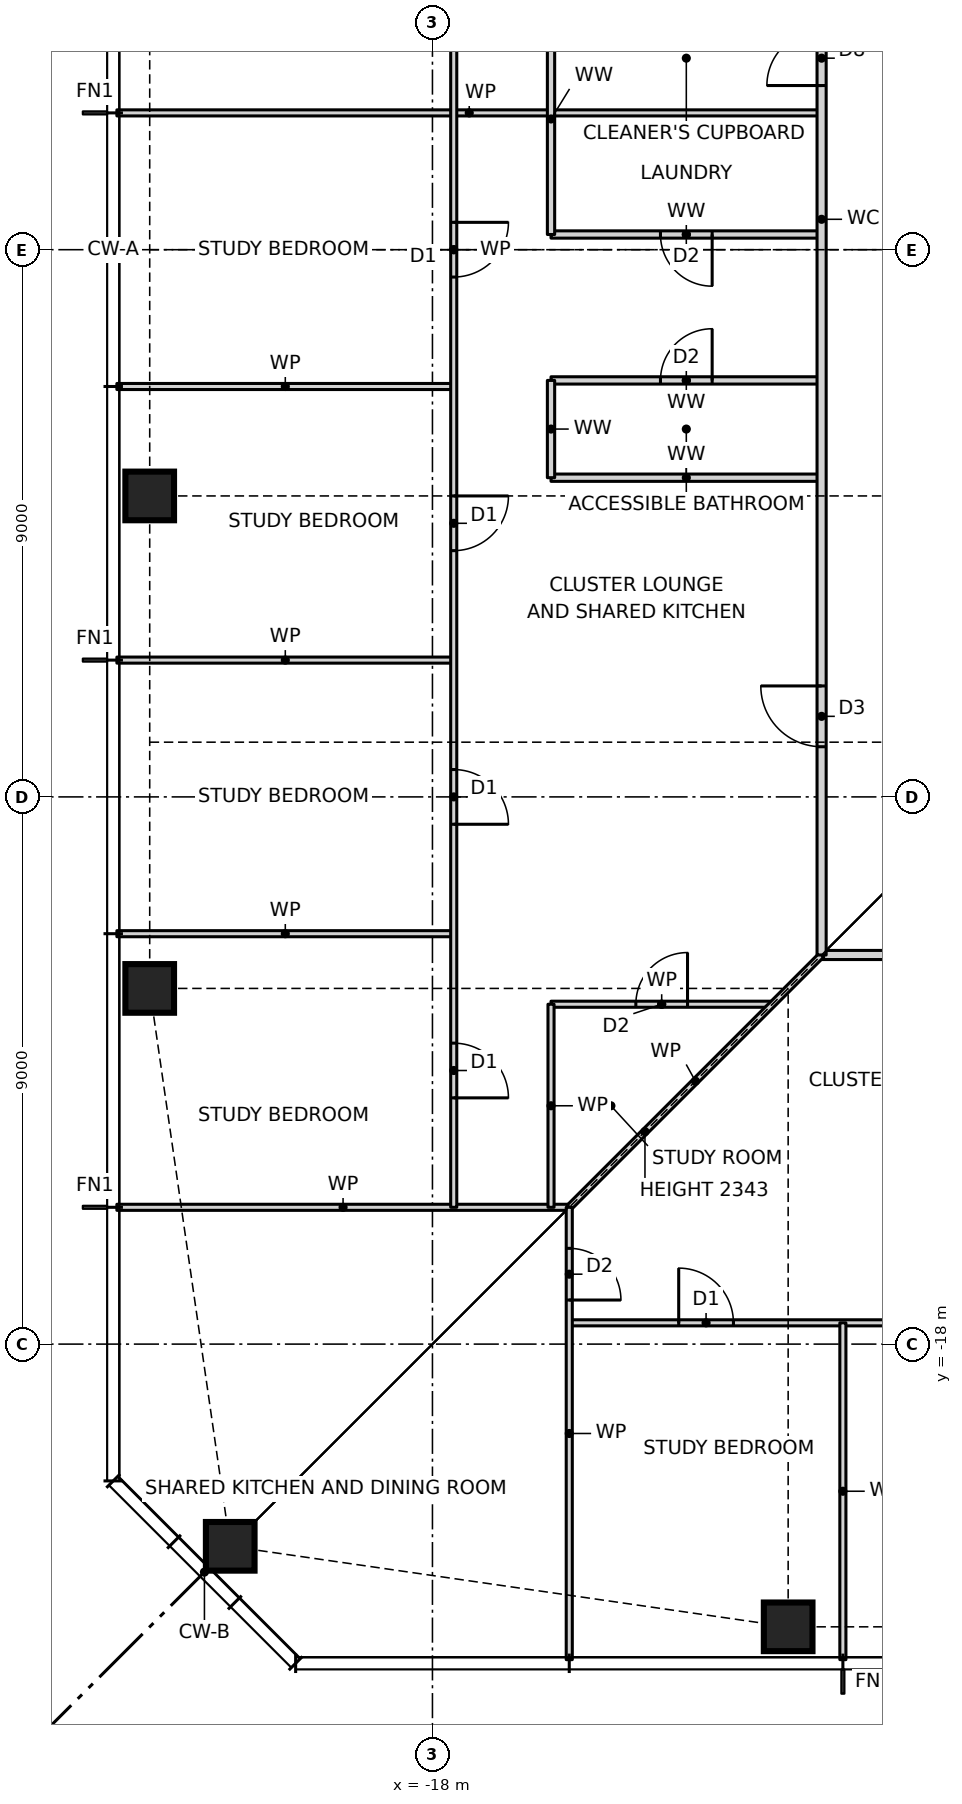
"""IFC4 building model, lengths in metres.
Left out: names, types, materials, properties, quantities, classifications, styles, units other than length and angle.
Written with IfcOpenShell. Run it as: python <this file> out.ifc"""

import sys

from ifc_helpers import new_model, si_unit, direction, frame, frame_2d, origin, origin_2d, place, context, subcontext, project, spatial, rectangle, hollow_rectangle, extrude, element, fill, save


model = new_model("IFC4")
c1 = context("Model", 3, precision=1e-05, world=origin(), true_north=direction((0.0, 1.0)))
c2 = subcontext(c1, "Body", "Model", "MODEL_VIEW")
j1 = project(units=[si_unit("LENGTHUNIT", "METRE"), si_unit("PLANEANGLEUNIT", "RADIAN")], contexts=[c1])
p1 = place(None, origin())
s1 = spatial("IfcSite", under=j1, at=p1, CompositionType="ELEMENT")
p2 = place(p1, origin())
s2 = spatial("IfcBuilding", under=s1, at=p2, CompositionType="ELEMENT")
p3 = place(p2, frame((0.0, 0.0, 57.0)))
s3 = spatial("IfcBuildingStorey", under=s2, at=p3, CompositionType="ELEMENT", Elevation=57.0)
for number, where, z_axis, x_axis in (
    (1, (-21.326, -21.326, 0.0), (0.0, 0.0, 1.0), (1.0, 0.0, 0.0)),
    (2, (-12.15, -22.65, 0.0), (0.0, 0.0, 1.0), (1.0, 0.0, 0.0)),
    (3, (-22.65, -4.05, 0.0), (0.0, 0.0, 1.0), (1.0, 0.0, 0.0)),
    (4, (-22.65, -12.15, 0.0), (0.0, 0.0, 1.0), (1.0, 0.0, 0.0)),
):
    element("IfcColumn", number, at=place(p3, frame(where, z_axis=z_axis, x_axis=x_axis)), inside=s3, PredefinedType="COLUMN", context=c2, shape_type="SweptSolid", body=[
        extrude(hollow_rectangle(XDim=0.8, YDim=0.8, WallThickness=0.09, at=origin_2d()), origin(), (0.0, 0.0, 1.0), 3.5),
    ])
p4 = place(p3, frame((-15.75, -17.65, 0.0), z_axis=(0.0, 0.0, 1.0), x_axis=(1.0, 0.0, 0.0)))
e5 = element("IfcWall", 5, at=p4, inside=s3, PredefinedType="PARTITIONING", context=c2, shape_type="SweptSolid", body=[
    extrude(rectangle(XDim=31.5, YDim=0.1, at=frame_2d((15.75, 0.0))), origin(), (0.0, 0.0, 1.0), 3.27),
])
p5 = place(p4, frame((1.8, 0.0, 0.0)))
e6 = element("IfcOpeningElement", 6, at=p5, cuts=e5, PredefinedType="OPENING", context=c2, shape_type="SweptSolid", body=[
    extrude(rectangle(XDim=0.9, YDim=2.1, at=frame_2d((0.45, 1.05))), frame((0.0, 0.06, 0.0), z_axis=(0.0, -1.0, 0.0), x_axis=(1.0, 0.0, 0.0)), (0.0, 0.0, 1.0), 0.12),
])
p6 = place(p4, frame((6.3, 0.0, 0.0)))
e7 = element("IfcOpeningElement", 7, at=p6, cuts=e5, PredefinedType="OPENING", context=c2, shape_type="SweptSolid", body=[
    extrude(rectangle(XDim=0.9, YDim=2.1, at=frame_2d((0.45, 1.05))), frame((0.0, 0.06, 0.0), z_axis=(0.0, -1.0, 0.0), x_axis=(1.0, 0.0, 0.0)), (0.0, 0.0, 1.0), 0.12),
])
p7 = place(p4, frame((10.8, 0.0, 0.0)))
e8 = element("IfcOpeningElement", 8, at=p7, cuts=e5, PredefinedType="OPENING", context=c2, shape_type="SweptSolid", body=[
    extrude(rectangle(XDim=0.9, YDim=2.1, at=frame_2d((0.45, 1.05))), frame((0.0, 0.06, 0.0), z_axis=(0.0, -1.0, 0.0), x_axis=(1.0, 0.0, 0.0)), (0.0, 0.0, 1.0), 0.12),
])
p8 = place(p4, frame((15.3, 0.0, 0.0)))
e9 = element("IfcOpeningElement", 9, at=p8, cuts=e5, PredefinedType="OPENING", context=c2, shape_type="SweptSolid", body=[
    extrude(rectangle(XDim=0.9, YDim=2.1, at=frame_2d((0.45, 1.05))), frame((0.0, 0.06, 0.0), z_axis=(0.0, -1.0, 0.0), x_axis=(1.0, 0.0, 0.0)), (0.0, 0.0, 1.0), 0.12),
])
p9 = place(p4, frame((19.8, 0.0, 0.0)))
e10 = element("IfcOpeningElement", 10, at=p9, cuts=e5, PredefinedType="OPENING", context=c2, shape_type="SweptSolid", body=[
    extrude(rectangle(XDim=0.9, YDim=2.1, at=frame_2d((0.45, 1.05))), frame((0.0, 0.06, 0.0), z_axis=(0.0, -1.0, 0.0), x_axis=(1.0, 0.0, 0.0)), (0.0, 0.0, 1.0), 0.12),
])
p10 = place(p4, frame((24.3, 0.0, 0.0)))
e11 = element("IfcOpeningElement", 11, at=p10, cuts=e5, PredefinedType="OPENING", context=c2, shape_type="SweptSolid", body=[
    extrude(rectangle(XDim=0.9, YDim=2.1, at=frame_2d((0.45, 1.05))), frame((0.0, 0.06, 0.0), z_axis=(0.0, -1.0, 0.0), x_axis=(1.0, 0.0, 0.0)), (0.0, 0.0, 1.0), 0.12),
])
p11 = place(p4, frame((28.8, 0.0, 0.0)))
e12 = element("IfcOpeningElement", 12, at=p11, cuts=e5, PredefinedType="OPENING", context=c2, shape_type="SweptSolid", body=[
    extrude(rectangle(XDim=0.9, YDim=2.1, at=frame_2d((0.45, 1.05))), frame((0.0, 0.06, 0.0), z_axis=(0.0, -1.0, 0.0), x_axis=(1.0, 0.0, 0.0)), (0.0, 0.0, 1.0), 0.12),
])
p12 = place(p3, frame((-23.19, -15.75, 0.0), z_axis=(0.0, 0.0, 1.0), x_axis=(1.0, 0.0, 0.0)))
e13 = element("IfcWall", 13, at=p12, inside=s3, PredefinedType="PARTITIONING", context=c2, shape_type="SweptSolid", body=[
    extrude(rectangle(XDim=7.44, YDim=0.1, at=frame_2d((3.72, 0.0))), origin(), (0.0, 0.0, 1.0), 3.27),
])
p13 = place(p3, frame((-16.05, -12.41, 0.0), z_axis=(0.0, 0.0, 1.0), x_axis=(1.0, 0.0, 0.0)))
e14 = element("IfcWall", 14, at=p13, inside=s3, PredefinedType="PARTITIONING", context=c2, shape_type="SweptSolid", body=[
    extrude(rectangle(XDim=3.64, YDim=0.1, at=frame_2d((1.82, 0.0))), origin(), (0.0, 0.0, 1.0), 3.27),
])
p14 = place(p13, frame((1.395, 0.0, 0.0)))
e15 = element("IfcOpeningElement", 15, at=p14, cuts=e14, PredefinedType="OPENING", context=c2, shape_type="SweptSolid", body=[
    extrude(rectangle(XDim=0.85, YDim=2.1, at=frame_2d((0.425, 1.05))), frame((0.0, 0.06, 0.0), z_axis=(0.0, -1.0, 0.0), x_axis=(1.0, 0.0, 0.0)), (0.0, 0.0, 1.0), 0.12),
])
p15 = place(p3, frame((-11.6, -11.6, 0.0), z_axis=(0.0, 0.0, 1.0), x_axis=(1.0, 0.0, 0.0)))
e16 = element("IfcWall", 16, at=p15, inside=s3, PredefinedType="PARTITIONING", context=c2, shape_type="SweptSolid", body=[
    extrude(rectangle(XDim=23.2, YDim=0.15, at=frame_2d((11.6, 0.0))), origin(), (0.0, 0.0, 1.0), 3.27),
])
p16 = place(p15, frame((1.755, 0.0, 0.0)))
e17 = element("IfcOpeningElement", 17, at=p16, cuts=e16, PredefinedType="OPENING", context=c2, shape_type="SweptSolid", body=[
    extrude(rectangle(XDim=1.0, YDim=2.1, at=frame_2d((0.5, 1.05))), frame((0.0, 0.085, 0.0), z_axis=(0.0, -1.0, 0.0), x_axis=(1.0, 0.0, 0.0)), (0.0, 0.0, 1.0), 0.17),
])
p17 = place(p15, frame((21.025, 0.0, 0.0)))
e18 = element("IfcOpeningElement", 18, at=p17, cuts=e16, PredefinedType="OPENING", context=c2, shape_type="SweptSolid", body=[
    extrude(rectangle(XDim=1.0, YDim=2.1, at=frame_2d((0.5, 1.05))), frame((0.0, 0.085, 0.0), z_axis=(0.0, -1.0, 0.0), x_axis=(1.0, 0.0, 0.0)), (0.0, 0.0, 1.0), 0.17),
])
for number, where, z_axis, x_axis in (
    (19, (-23.19, -11.25, 0.0), (0.0, 0.0, 1.0), (1.0, 0.0, 0.0)),
    (20, (-23.19, -6.75, 0.0), (0.0, 0.0, 1.0), (1.0, 0.0, 0.0)),
):
    element("IfcWall", number, at=place(p3, frame(where, z_axis=z_axis, x_axis=x_axis)), inside=s3, PredefinedType="PARTITIONING", context=c2, shape_type="SweptSolid", body=[
        extrude(rectangle(XDim=5.54, YDim=0.1, at=frame_2d((2.77, 0.0))), origin(), (0.0, 0.0, 1.0), 3.27),
    ])
p18 = place(p3, frame((-16.05, -3.75, 0.0), z_axis=(0.0, 0.0, 1.0), x_axis=(1.0, 0.0, 0.0)))
e21 = element("IfcWall", 21, at=p18, inside=s3, PredefinedType="PARTITIONING", context=c2, shape_type="SweptSolid", body=[
    extrude(rectangle(XDim=4.45, YDim=0.12, at=frame_2d((2.225, 0.0))), origin(), (0.0, 0.0, 1.0), 3.27),
])
p19 = place(p3, frame((-23.19, -2.25, 0.0), z_axis=(0.0, 0.0, 1.0), x_axis=(1.0, 0.0, 0.0)))
e22 = element("IfcWall", 22, at=p19, inside=s3, PredefinedType="PARTITIONING", context=c2, shape_type="SweptSolid", body=[
    extrude(rectangle(XDim=5.54, YDim=0.1, at=frame_2d((2.77, 0.0))), origin(), (0.0, 0.0, 1.0), 3.27),
])
p20 = place(p3, frame((-16.05, -2.15, 0.0), z_axis=(0.0, 0.0, 1.0), x_axis=(1.0, 0.0, 0.0)))
e23 = element("IfcWall", 23, at=p20, inside=s3, PredefinedType="PARTITIONING", context=c2, shape_type="SweptSolid", body=[
    extrude(rectangle(XDim=4.45, YDim=0.12, at=frame_2d((2.225, 0.0))), origin(), (0.0, 0.0, 1.0), 3.27),
])
p21 = place(p20, frame((1.8, 0.0, 0.0)))
e24 = element("IfcOpeningElement", 24, at=p21, cuts=e23, PredefinedType="OPENING", context=c2, shape_type="SweptSolid", body=[
    extrude(rectangle(XDim=0.85, YDim=2.1, at=frame_2d((0.425, 1.05))), frame((0.0, 0.07, 0.0), z_axis=(0.0, -1.0, 0.0), x_axis=(1.0, 0.0, 0.0)), (0.0, 0.0, 1.0), 0.14),
])
p22 = place(p3, frame((-16.05, 0.25, 0.0), z_axis=(0.0, 0.0, 1.0), x_axis=(1.0, 0.0, 0.0)))
e25 = element("IfcWall", 25, at=p22, inside=s3, PredefinedType="PARTITIONING", context=c2, shape_type="SweptSolid", body=[
    extrude(rectangle(XDim=4.45, YDim=0.12, at=frame_2d((2.225, 0.0))), origin(), (0.0, 0.0, 1.0), 3.27),
])
p23 = place(p22, frame((1.8, 0.0, 0.0)))
e26 = element("IfcOpeningElement", 26, at=p23, cuts=e25, PredefinedType="OPENING", context=c2, shape_type="SweptSolid", body=[
    extrude(rectangle(XDim=0.85, YDim=2.1, at=frame_2d((0.425, 1.05))), frame((0.0, 0.07, 0.0), z_axis=(0.0, -1.0, 0.0), x_axis=(1.0, 0.0, 0.0)), (0.0, 0.0, 1.0), 0.14),
])
p24 = place(p3, frame((-23.19, 2.25, 0.0), z_axis=(0.0, 0.0, 1.0), x_axis=(1.0, 0.0, 0.0)))
e27 = element("IfcWall", 27, at=p24, inside=s3, PredefinedType="PARTITIONING", context=c2, shape_type="SweptSolid", body=[
    extrude(rectangle(XDim=11.59, YDim=0.1, at=frame_2d((5.795, 0.0))), origin(), (0.0, 0.0, 1.0), 3.27),
])
p25 = place(p3, frame((-15.75, -15.75, 0.0), z_axis=(0.0, 0.0, 1.0), x_axis=(0.707106781187, 0.707106781187, 0.0)))
e28 = element("IfcWall", 28, at=p25, inside=s3, PredefinedType="PARTITIONING", context=c2, shape_type="SweptSolid", body=[
    extrude(rectangle(XDim=5.869, YDim=0.1, at=frame_2d((2.935, 0.0))), origin(), (0.0, 0.0, 1.0), 2.343),
])
p26 = place(p3, frame((-11.25, -23.19, 0.0), z_axis=(0.0, 0.0, 1.0), x_axis=(0.0, 1.0, 0.0)))
e29 = element("IfcWall", 29, at=p26, inside=s3, PredefinedType="PARTITIONING", context=c2, shape_type="SweptSolid", body=[
    extrude(rectangle(XDim=5.54, YDim=0.1, at=frame_2d((2.77, 0.0))), origin(), (0.0, 0.0, 1.0), 3.27),
])
p27 = place(p3, frame((-11.6, -11.6, 0.0), z_axis=(0.0, 0.0, 1.0), x_axis=(0.0, 1.0, 0.0)))
e30 = element("IfcWall", 30, at=p27, inside=s3, PredefinedType="PARTITIONING", context=c2, shape_type="SweptSolid", body=[
    extrude(rectangle(XDim=24.2, YDim=0.15, at=frame_2d((12.1, 0.0))), origin(), (0.0, 0.0, 1.0), 3.27),
])
p28 = place(p27, frame((20.125, 0.0, 0.0)))
e31 = element("IfcOpeningElement", 31, at=p28, cuts=e30, PredefinedType="OPENING", context=c2, shape_type="SweptSolid", body=[
    extrude(rectangle(XDim=1.0, YDim=2.1, at=frame_2d((0.5, 1.05))), frame((0.0, 0.085, 0.0), z_axis=(0.0, -1.0, 0.0), x_axis=(1.0, 0.0, 0.0)), (0.0, 0.0, 1.0), 0.17),
])
p29 = place(p27, frame((14.3, 0.0, 0.0)))
e32 = element("IfcOpeningElement", 32, at=p29, cuts=e30, PredefinedType="OPENING", context=c2, shape_type="SweptSolid", body=[
    extrude(rectangle(XDim=0.9, YDim=2.1, at=frame_2d((0.45, 1.05))), frame((0.0, 0.085, 0.0), z_axis=(0.0, -1.0, 0.0), x_axis=(1.0, 0.0, 0.0)), (0.0, 0.0, 1.0), 0.17),
])
p30 = place(p27, frame((3.425, 0.0, 0.0)))
e33 = element("IfcOpeningElement", 33, at=p30, cuts=e30, PredefinedType="OPENING", context=c2, shape_type="SweptSolid", body=[
    extrude(rectangle(XDim=1.0, YDim=2.1, at=frame_2d((0.5, 1.05))), frame((0.0, 0.085, 0.0), z_axis=(0.0, -1.0, 0.0), x_axis=(1.0, 0.0, 0.0)), (0.0, 0.0, 1.0), 0.17),
])
p31 = place(p3, frame((-15.75, -23.19, 0.0), z_axis=(0.0, 0.0, 1.0), x_axis=(0.0, 1.0, 0.0)))
e34 = element("IfcWall", 34, at=p31, inside=s3, PredefinedType="PARTITIONING", context=c2, shape_type="SweptSolid", body=[
    extrude(rectangle(XDim=7.44, YDim=0.1, at=frame_2d((3.72, 0.0))), origin(), (0.0, 0.0, 1.0), 3.27),
])
p32 = place(p31, frame((5.915, 0.0, 0.0)))
e35 = element("IfcOpeningElement", 35, at=p32, cuts=e34, PredefinedType="OPENING", context=c2, shape_type="SweptSolid", body=[
    extrude(rectangle(XDim=0.85, YDim=2.1, at=frame_2d((0.425, 1.05))), frame((0.0, 0.06, 0.0), z_axis=(0.0, -1.0, 0.0), x_axis=(1.0, 0.0, 0.0)), (0.0, 0.0, 1.0), 0.12),
])
p33 = place(p3, frame((-16.05, -15.75, 0.0), z_axis=(0.0, 0.0, 1.0), x_axis=(0.0, 1.0, 0.0)))
e36 = element("IfcWall", 36, at=p33, inside=s3, PredefinedType="PARTITIONING", context=c2, shape_type="SweptSolid", body=[
    extrude(rectangle(XDim=3.34, YDim=0.1, at=frame_2d((1.67, 0.0))), origin(), (0.0, 0.0, 1.0), 3.27),
])
p34 = place(p3, frame((-16.05, -3.75, 0.0), z_axis=(0.0, 0.0, 1.0), x_axis=(0.0, 1.0, 0.0)))
e37 = element("IfcWall", 37, at=p34, inside=s3, PredefinedType="PARTITIONING", context=c2, shape_type="SweptSolid", body=[
    extrude(rectangle(XDim=1.6, YDim=0.12, at=frame_2d((0.8, 0.0))), origin(), (0.0, 0.0, 1.0), 3.27),
])
p35 = place(p3, frame((-16.05, 0.25, 0.0), z_axis=(0.0, 0.0, 1.0), x_axis=(0.0, 1.0, 0.0)))
e38 = element("IfcWall", 38, at=p35, inside=s3, PredefinedType="PARTITIONING", context=c2, shape_type="SweptSolid", body=[
    extrude(rectangle(XDim=3.8, YDim=0.12, at=frame_2d((1.9, 0.0))), origin(), (0.0, 0.0, 1.0), 3.27),
])
p36 = place(p3, frame((-17.65, -15.75, 0.0), z_axis=(0.0, 0.0, 1.0), x_axis=(0.0, 1.0, 0.0)))
e39 = element("IfcWall", 39, at=p36, inside=s3, PredefinedType="PARTITIONING", context=c2, shape_type="SweptSolid", body=[
    extrude(rectangle(XDim=31.5, YDim=0.1, at=frame_2d((15.75, 0.0))), origin(), (0.0, 0.0, 1.0), 3.27),
])
p37 = place(p36, frame((28.8, 0.0, 0.0)))
e40 = element("IfcOpeningElement", 40, at=p37, cuts=e39, PredefinedType="OPENING", context=c2, shape_type="SweptSolid", body=[
    extrude(rectangle(XDim=0.9, YDim=2.1, at=frame_2d((0.45, 1.05))), frame((0.0, 0.06, 0.0), z_axis=(0.0, -1.0, 0.0), x_axis=(1.0, 0.0, 0.0)), (0.0, 0.0, 1.0), 0.12),
])
p38 = place(p36, frame((24.3, 0.0, 0.0)))
e41 = element("IfcOpeningElement", 41, at=p38, cuts=e39, PredefinedType="OPENING", context=c2, shape_type="SweptSolid", body=[
    extrude(rectangle(XDim=0.9, YDim=2.1, at=frame_2d((0.45, 1.05))), frame((0.0, 0.06, 0.0), z_axis=(0.0, -1.0, 0.0), x_axis=(1.0, 0.0, 0.0)), (0.0, 0.0, 1.0), 0.12),
])
p39 = place(p36, frame((19.8, 0.0, 0.0)))
e42 = element("IfcOpeningElement", 42, at=p39, cuts=e39, PredefinedType="OPENING", context=c2, shape_type="SweptSolid", body=[
    extrude(rectangle(XDim=0.9, YDim=2.1, at=frame_2d((0.45, 1.05))), frame((0.0, 0.06, 0.0), z_axis=(0.0, -1.0, 0.0), x_axis=(1.0, 0.0, 0.0)), (0.0, 0.0, 1.0), 0.12),
])
p40 = place(p36, frame((15.3, 0.0, 0.0)))
e43 = element("IfcOpeningElement", 43, at=p40, cuts=e39, PredefinedType="OPENING", context=c2, shape_type="SweptSolid", body=[
    extrude(rectangle(XDim=0.9, YDim=2.1, at=frame_2d((0.45, 1.05))), frame((0.0, 0.06, 0.0), z_axis=(0.0, -1.0, 0.0), x_axis=(1.0, 0.0, 0.0)), (0.0, 0.0, 1.0), 0.12),
])
p41 = place(p36, frame((10.8, 0.0, 0.0)))
e44 = element("IfcOpeningElement", 44, at=p41, cuts=e39, PredefinedType="OPENING", context=c2, shape_type="SweptSolid", body=[
    extrude(rectangle(XDim=0.9, YDim=2.1, at=frame_2d((0.45, 1.05))), frame((0.0, 0.06, 0.0), z_axis=(0.0, -1.0, 0.0), x_axis=(1.0, 0.0, 0.0)), (0.0, 0.0, 1.0), 0.12),
])
p42 = place(p36, frame((6.3, 0.0, 0.0)))
e45 = element("IfcOpeningElement", 45, at=p42, cuts=e39, PredefinedType="OPENING", context=c2, shape_type="SweptSolid", body=[
    extrude(rectangle(XDim=0.9, YDim=2.1, at=frame_2d((0.45, 1.05))), frame((0.0, 0.06, 0.0), z_axis=(0.0, -1.0, 0.0), x_axis=(1.0, 0.0, 0.0)), (0.0, 0.0, 1.0), 0.12),
])
p43 = place(p36, frame((1.8, 0.0, 0.0)))
e46 = element("IfcOpeningElement", 46, at=p43, cuts=e39, PredefinedType="OPENING", context=c2, shape_type="SweptSolid", body=[
    extrude(rectangle(XDim=0.9, YDim=2.1, at=frame_2d((0.45, 1.05))), frame((0.0, 0.06, 0.0), z_axis=(0.0, -1.0, 0.0), x_axis=(1.0, 0.0, 0.0)), (0.0, 0.0, 1.0), 0.12),
])
p44 = place(p5, origin())
e47 = element("IfcDoor", 47, at=p44, inside=s3, OperationType="SINGLE_SWING_LEFT", PredefinedType="DOOR", context=c2, shape_type="SweptSolid", body=[
    extrude(rectangle(XDim=0.9, YDim=2.1, at=frame_2d((0.45, 1.05))), frame((0.0, 0.025, 0.0), z_axis=(0.0, -1.0, 0.0), x_axis=(1.0, 0.0, 0.0)), (0.0, 0.0, 1.0), 0.05),
])
fill(e6, e47)
p45 = place(p29, origin())
e48 = element("IfcDoor", 48, at=p45, inside=s3, OperationType="SINGLE_SWING_LEFT", PredefinedType="DOOR", context=c2, shape_type="SweptSolid", body=[
    extrude(rectangle(XDim=0.9, YDim=2.1, at=frame_2d((0.45, 1.05))), frame((0.0, 0.025, 0.0), z_axis=(0.0, -1.0, 0.0), x_axis=(1.0, 0.0, 0.0)), (0.0, 0.0, 1.0), 0.05),
])
fill(e32, e48)
p46 = place(p40, frame((0.9, 0.0, 0.0), z_axis=(0.0, 0.0, 1.0), x_axis=(-1.0, 0.0, 0.0)))
e49 = element("IfcDoor", 49, at=p46, inside=s3, OperationType="SINGLE_SWING_LEFT", PredefinedType="DOOR", context=c2, shape_type="SweptSolid", body=[
    extrude(rectangle(XDim=0.9, YDim=2.1, at=frame_2d((0.45, 1.05))), frame((0.0, 0.025, 0.0), z_axis=(0.0, -1.0, 0.0), x_axis=(1.0, 0.0, 0.0)), (0.0, 0.0, 1.0), 0.05),
])
fill(e43, e49)
p47 = place(p41, frame((0.9, 0.0, 0.0), z_axis=(0.0, 0.0, 1.0), x_axis=(-1.0, 0.0, 0.0)))
e50 = element("IfcDoor", 50, at=p47, inside=s3, OperationType="SINGLE_SWING_LEFT", PredefinedType="DOOR", context=c2, shape_type="SweptSolid", body=[
    extrude(rectangle(XDim=0.9, YDim=2.1, at=frame_2d((0.45, 1.05))), frame((0.0, 0.025, 0.0), z_axis=(0.0, -1.0, 0.0), x_axis=(1.0, 0.0, 0.0)), (0.0, 0.0, 1.0), 0.05),
])
fill(e44, e50)
p48 = place(p42, frame((0.9, 0.0, 0.0), z_axis=(0.0, 0.0, 1.0), x_axis=(-1.0, 0.0, 0.0)))
e51 = element("IfcDoor", 51, at=p48, inside=s3, OperationType="SINGLE_SWING_RIGHT", PredefinedType="DOOR", context=c2, shape_type="SweptSolid", body=[
    extrude(rectangle(XDim=0.9, YDim=2.1, at=frame_2d((0.45, 1.05))), frame((0.0, 0.025, 0.0), z_axis=(0.0, -1.0, 0.0), x_axis=(1.0, 0.0, 0.0)), (0.0, 0.0, 1.0), 0.05),
])
fill(e45, e51)
p49 = place(p43, frame((0.9, 0.0, 0.0), z_axis=(0.0, 0.0, 1.0), x_axis=(-1.0, 0.0, 0.0)))
e52 = element("IfcDoor", 52, at=p49, inside=s3, OperationType="SINGLE_SWING_RIGHT", PredefinedType="DOOR", context=c2, shape_type="SweptSolid", body=[
    extrude(rectangle(XDim=0.9, YDim=2.1, at=frame_2d((0.45, 1.05))), frame((0.0, 0.025, 0.0), z_axis=(0.0, -1.0, 0.0), x_axis=(1.0, 0.0, 0.0)), (0.0, 0.0, 1.0), 0.05),
])
fill(e46, e52)
p50 = place(p30, origin())
e53 = element("IfcDoor", 53, at=p50, inside=s3, OperationType="SINGLE_SWING_RIGHT", PredefinedType="DOOR", context=c2, shape_type="SweptSolid", body=[
    extrude(rectangle(XDim=1.0, YDim=2.1, at=frame_2d((0.5, 1.05))), frame((0.0, 0.025, 0.0), z_axis=(0.0, -1.0, 0.0), x_axis=(1.0, 0.0, 0.0)), (0.0, 0.0, 1.0), 0.05),
])
fill(e33, e53)
p51 = place(p23, frame((0.85, 0.0, 0.0), z_axis=(0.0, 0.0, 1.0), x_axis=(-1.0, 0.0, 0.0)))
e54 = element("IfcDoor", 54, at=p51, inside=s3, OperationType="SINGLE_SWING_LEFT", PredefinedType="DOOR", context=c2, shape_type="SweptSolid", body=[
    extrude(rectangle(XDim=0.85, YDim=2.1, at=frame_2d((0.425, 1.05))), frame((0.0, 0.025, 0.0), z_axis=(0.0, -1.0, 0.0), x_axis=(1.0, 0.0, 0.0)), (0.0, 0.0, 1.0), 0.05),
])
fill(e26, e54)
p52 = place(p21, origin())
e55 = element("IfcDoor", 55, at=p52, inside=s3, OperationType="SINGLE_SWING_RIGHT", PredefinedType="DOOR", context=c2, shape_type="SweptSolid", body=[
    extrude(rectangle(XDim=0.85, YDim=2.1, at=frame_2d((0.425, 1.05))), frame((0.0, 0.025, 0.0), z_axis=(0.0, -1.0, 0.0), x_axis=(1.0, 0.0, 0.0)), (0.0, 0.0, 1.0), 0.05),
])
fill(e24, e55)
p53 = place(p14, origin())
e56 = element("IfcDoor", 56, at=p53, inside=s3, OperationType="SINGLE_SWING_RIGHT", PredefinedType="DOOR", context=c2, shape_type="SweptSolid", body=[
    extrude(rectangle(XDim=0.85, YDim=2.1, at=frame_2d((0.425, 1.05))), frame((0.0, 0.025, 0.0), z_axis=(0.0, -1.0, 0.0), x_axis=(1.0, 0.0, 0.0)), (0.0, 0.0, 1.0), 0.05),
])
fill(e15, e56)
p54 = place(p32, frame((0.85, 0.0, 0.0), z_axis=(0.0, 0.0, 1.0), x_axis=(-1.0, 0.0, 0.0)))
e57 = element("IfcDoor", 57, at=p54, inside=s3, OperationType="SINGLE_SWING_RIGHT", PredefinedType="DOOR", context=c2, shape_type="SweptSolid", body=[
    extrude(rectangle(XDim=0.85, YDim=2.1, at=frame_2d((0.425, 1.05))), frame((0.0, 0.025, 0.0), z_axis=(0.0, -1.0, 0.0), x_axis=(1.0, 0.0, 0.0)), (0.0, 0.0, 1.0), 0.05),
])
fill(e35, e57)
save(model, sys.argv[1])
